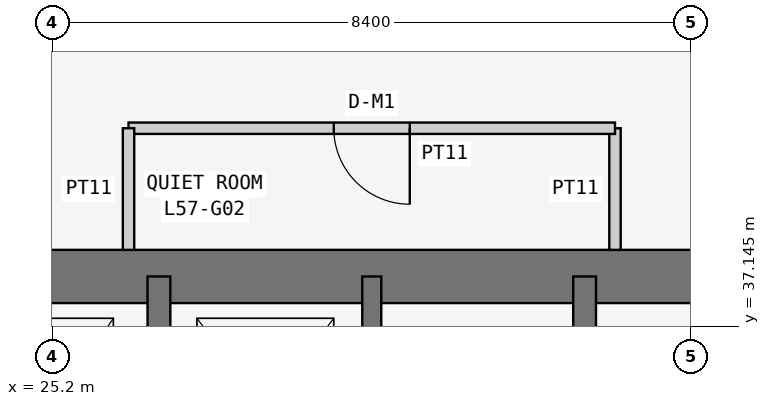
"""IFC4 building model, lengths in metres.
Left out: names, types, materials, properties, quantities, classifications, styles, units other than length and angle.
Written with IfcOpenShell. Run it as: python <this file> out.ifc"""

import sys

from ifc_helpers import new_model, si_unit, direction, frame, frame_2d, origin, place, context, subcontext, project, spatial, rectangle, extrude, element, fill, save


model = new_model("IFC4")
c1 = context("Model", 3, precision=1e-05, world=origin(), true_north=direction((0.0, 1.0)))
c2 = subcontext(c1, "Body", "Model", "MODEL_VIEW")
j1 = project(units=[si_unit("LENGTHUNIT", "METRE"), si_unit("PLANEANGLEUNIT", "RADIAN")], contexts=[c1])
p1 = place(None, origin())
s1 = spatial("IfcSite", under=j1, at=p1, CompositionType="ELEMENT")
p2 = place(p1, origin())
s2 = spatial("IfcBuilding", under=s1, at=p2, CompositionType="ELEMENT")
p3 = place(p2, frame((0.0, 0.0, 219.3)))
s3 = spatial("IfcBuildingStorey", under=s2, at=p3, CompositionType="ELEMENT", Elevation=219.3)
p4 = place(p3, frame((37.8, 37.8, 0.0), z_axis=(0.0, 0.0, 1.0), x_axis=(-1.0, 0.0, 0.0)))
e1 = element("IfcWall", 1, at=p4, inside=s3, PredefinedType="SHEAR", context=c2, shape_type="SweptSolid", body=[
    extrude(rectangle(XDim=17.15, YDim=0.7, at=frame_2d((8.575, 0.0))), origin(), (0.0, 0.0, 1.0), 3.6),
])
p5 = place(p3, frame((26.6, 21.0, 0.0), z_axis=(0.0, 0.0, 1.0), x_axis=(0.0, 1.0, 0.0)))
e2 = element("IfcWall", 2, at=p5, inside=s3, PredefinedType="SHEAR", context=c2, shape_type="SweptSolid", body=[
    extrude(rectangle(XDim=16.8, YDim=0.3, at=frame_2d((8.4, 0.0))), origin(), (0.0, 0.0, 1.0), 3.6),
])
p6 = place(p5, frame((10.4, 0.0, 0.0)))
e3 = element("IfcOpeningElement", 3, at=p6, cuts=e2, PredefinedType="OPENING", context=c2, shape_type="SweptSolid", body=[
    extrude(rectangle(XDim=1.2, YDim=2.1, at=frame_2d((0.6, 1.05))), frame((0.0, 0.16, 0.0), z_axis=(0.0, -1.0, 0.0), x_axis=(1.0, 0.0, 0.0)), (0.0, 0.0, 1.0), 0.32),
])
p7 = place(p3, frame((32.2, 29.25, 0.0), z_axis=(0.0, 0.0, 1.0), x_axis=(0.0, 1.0, 0.0)))
e4 = element("IfcWall", 4, at=p7, inside=s3, PredefinedType="SHEAR", context=c2, shape_type="SweptSolid", body=[
    extrude(rectangle(XDim=8.55, YDim=0.3, at=frame_2d((4.275, 0.0))), origin(), (0.0, 0.0, 1.0), 3.6),
])
p8 = place(p3, frame((29.4, 34.6, 0.0), z_axis=(0.0, 0.0, 1.0), x_axis=(0.0, 1.0, 0.0)))
e5 = element("IfcWall", 5, at=p8, inside=s3, PredefinedType="SHEAR", context=c2, shape_type="SweptSolid", body=[
    extrude(rectangle(XDim=3.2, YDim=0.25, at=frame_2d((1.6, 0.0))), origin(), (0.0, 0.0, 1.0), 3.6),
])
p9 = place(p3, frame((32.6, 38.15, 0.0), z_axis=(0.0, 0.0, 1.0), x_axis=(0.0, 1.0, 0.0)))
e6 = element("IfcWall", 6, at=p9, inside=s3, PredefinedType="PARTITIONING", context=c2, shape_type="SweptSolid", body=[
    extrude(rectangle(XDim=1.6, YDim=0.15, at=frame_2d((0.8, 0.0))), origin(), (0.0, 0.0, 1.0), 3.45),
])
p10 = place(p3, frame((32.6, 39.75, 0.0), z_axis=(0.0, 0.0, 1.0), x_axis=(-1.0, 0.0, 0.0)))
e7 = element("IfcWall", 7, at=p10, inside=s3, PredefinedType="PARTITIONING", context=c2, shape_type="SweptSolid", body=[
    extrude(rectangle(XDim=6.4, YDim=0.15, at=frame_2d((3.2, 0.0))), origin(), (0.0, 0.0, 1.0), 3.45),
])
p11 = place(p10, frame((2.7, 0.0, 0.0)))
e8 = element("IfcOpeningElement", 8, at=p11, cuts=e7, PredefinedType="OPENING", context=c2, shape_type="SweptSolid", body=[
    extrude(rectangle(XDim=1.0, YDim=2.1, at=frame_2d((0.5, 1.05))), frame((0.0, 0.085, 0.0), z_axis=(0.0, -1.0, 0.0), x_axis=(1.0, 0.0, 0.0)), (0.0, 0.0, 1.0), 0.17),
])
p12 = place(p3, frame((26.2, 39.75, 0.0), z_axis=(0.0, 0.0, 1.0), x_axis=(0.0, -1.0, 0.0)))
e9 = element("IfcWall", 9, at=p12, inside=s3, PredefinedType="PARTITIONING", context=c2, shape_type="SweptSolid", body=[
    extrude(rectangle(XDim=1.6, YDim=0.15, at=frame_2d((0.8, 0.0))), origin(), (0.0, 0.0, 1.0), 3.45),
])
p13 = place(p11, origin())
e10 = element("IfcDoor", 10, at=p13, inside=s3, OperationType="SINGLE_SWING_LEFT", PredefinedType="DOOR", context=c2, shape_type="SweptSolid", body=[
    extrude(rectangle(XDim=1.0, YDim=2.1, at=frame_2d((0.5, 1.05))), frame((0.0, 0.025, 0.0), z_axis=(0.0, -1.0, 0.0), x_axis=(1.0, 0.0, 0.0)), (0.0, 0.0, 1.0), 0.05),
])
fill(e8, e10)
save(model, sys.argv[1])
